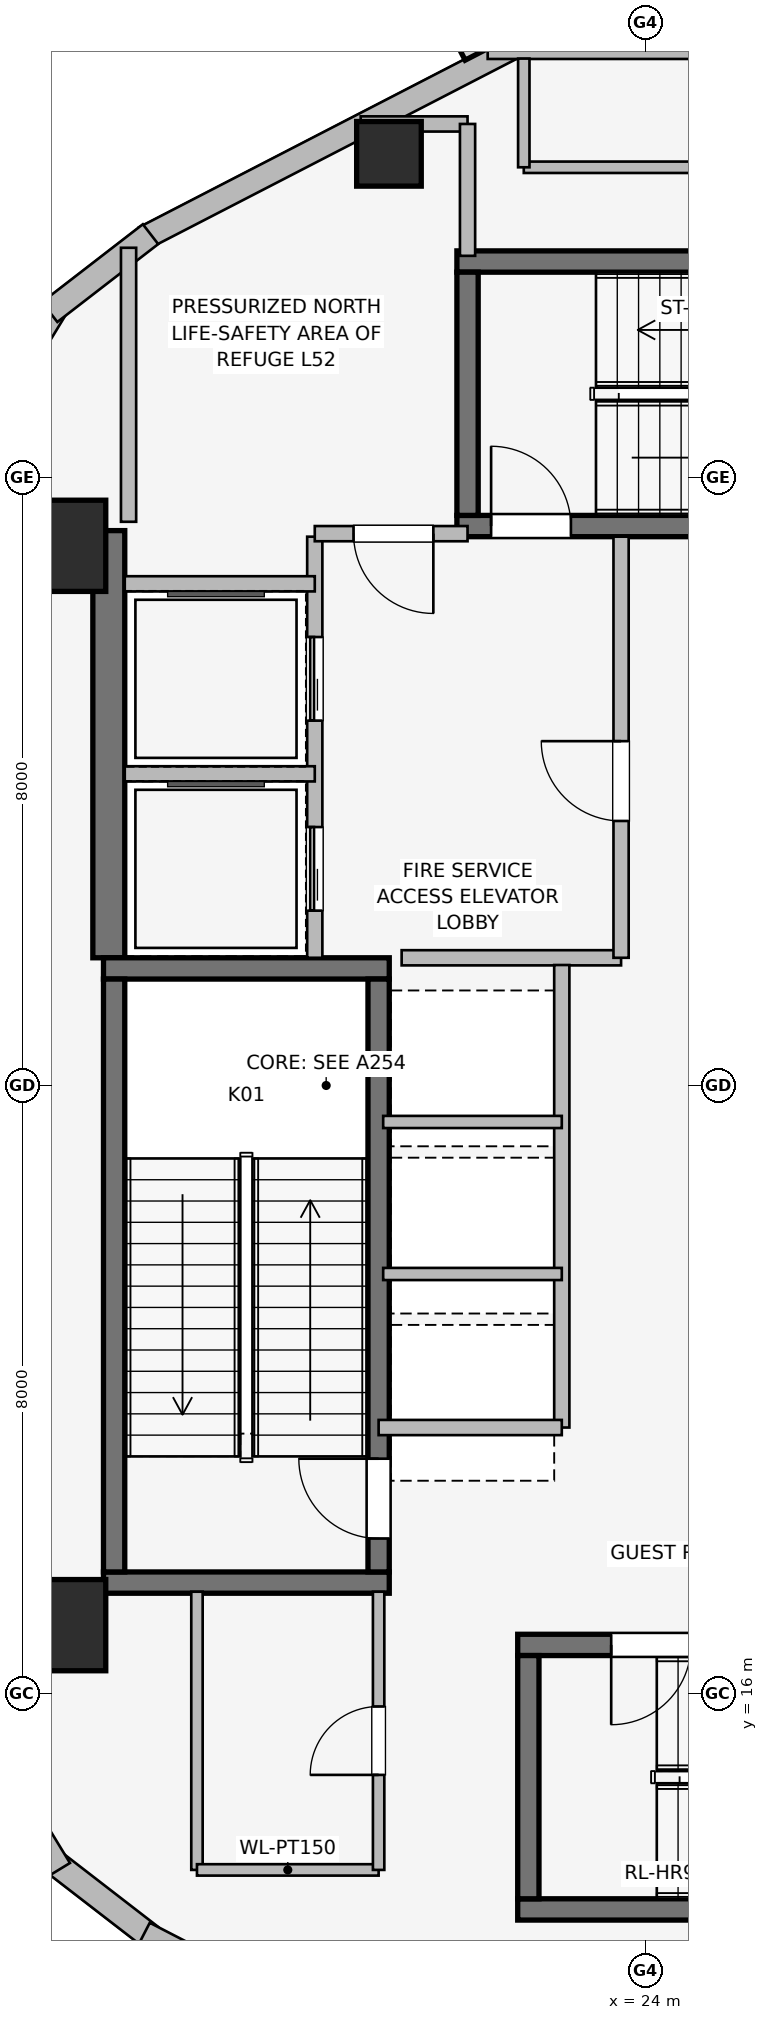
"""IFC4 building model, lengths in metres.
Left out: names, types, materials, properties, quantities, classifications, styles, units other than length and angle.
Written with IfcOpenShell. Run it as: python <this file> out.ifc"""

import sys

from ifc_helpers import new_model, si_unit, direction, frame, frame_2d, origin, origin_2d, place, context, subcontext, project, spatial, rectangle, extrude, element, fill, save


model = new_model("IFC4")
c1 = context("Model", 3, precision=1e-05, world=origin(), true_north=direction((0.0, 1.0)))
c2 = subcontext(c1, "Body", "Model", "MODEL_VIEW")
j1 = project(units=[si_unit("LENGTHUNIT", "METRE"), si_unit("PLANEANGLEUNIT", "RADIAN")], contexts=[c1])
p1 = place(None, origin())
s1 = spatial("IfcSite", under=j1, at=p1, CompositionType="ELEMENT")
p2 = place(p1, origin())
s2 = spatial("IfcBuilding", under=s1, at=p2, CompositionType="ELEMENT")
p3 = place(p2, frame((0.0, 0.0, 191.25)))
s3 = spatial("IfcBuildingStorey", under=s2, at=p3, CompositionType="ELEMENT", Elevation=191.25)
p4 = place(p3, frame((16.94, 25.68, 0.0), z_axis=(0.0, 0.0, 1.0), x_axis=(0.0, 1.0, 0.0)))
e1 = element("IfcWall", 1, at=p4, inside=s3, PredefinedType="SHEAR", context=c2, shape_type="SweptSolid", body=[
    extrude(rectangle(XDim=5.62, YDim=0.42, at=frame_2d((2.81, 0.0))), origin(), (0.0, 0.0, 1.0), 5.2),
])
for number, where, z_axis, x_axis in (
    (2, (16.87, 17.46, 0.0), (0.0, 0.0, 1.0), (1.0, 0.0, 0.0)),
    (3, (20.63, 25.54, 0.0), (0.0, 0.0, 1.0), (-1.0, 0.0, 0.0)),
):
    element("IfcWall", number, at=place(p3, frame(where, z_axis=z_axis, x_axis=x_axis)), inside=s3, PredefinedType="SHEAR", context=c2, shape_type="SweptSolid", body=[
        extrude(rectangle(XDim=3.76, YDim=0.28, at=frame_2d((1.88, 0.0))), origin(), (0.0, 0.0, 1.0), 5.2),
    ])
p5 = place(p3, frame((17.01, 25.4, 0.0), z_axis=(0.0, 0.0, 1.0), x_axis=(0.0, -1.0, 0.0)))
e4 = element("IfcWall", 4, at=p5, inside=s3, PredefinedType="SHEAR", context=c2, shape_type="SweptSolid", body=[
    extrude(rectangle(XDim=7.8, YDim=0.28, at=frame_2d((3.9, 0.0))), origin(), (0.0, 0.0, 1.0), 5.2),
])
p6 = place(p3, frame((20.49, 17.6, 0.0), z_axis=(0.0, 0.0, 1.0), x_axis=(0.0, 1.0, 0.0)))
e5 = element("IfcWall", 5, at=p6, inside=s3, PredefinedType="SHEAR", context=c2, shape_type="SweptSolid", body=[
    extrude(rectangle(XDim=7.8, YDim=0.28, at=frame_2d((3.9, 0.0))), origin(), (0.0, 0.0, 1.0), 5.2),
])
p7 = place(p6, frame((0.44, 0.0, 0.0)))
e6 = element("IfcOpeningElement", 6, at=p7, cuts=e5, PredefinedType="OPENING", context=c2, shape_type="SweptSolid", body=[
    extrude(rectangle(XDim=1.05, YDim=2.0, at=frame_2d((0.525, 1.0))), frame((0.0, 0.15, 0.0), z_axis=(0.0, -1.0, 0.0), x_axis=(1.0, 0.0, 0.0)), (0.0, 0.0, 1.0), 0.3),
])
p8 = place(p3, frame((22.32, 13.16, 0.0), z_axis=(0.0, 0.0, 1.0), x_axis=(1.0, 0.0, 0.0)))
e7 = element("IfcWall", 7, at=p8, inside=s3, PredefinedType="SHEAR", context=c2, shape_type="SweptSolid", body=[
    extrude(rectangle(XDim=8.36, YDim=0.28, at=frame_2d((4.18, 0.0))), origin(), (0.0, 0.0, 1.0), 5.2),
])
p9 = place(p3, frame((30.68, 16.64, 0.0), z_axis=(0.0, 0.0, 1.0), x_axis=(-1.0, 0.0, 0.0)))
e8 = element("IfcWall", 8, at=p9, inside=s3, PredefinedType="SHEAR", context=c2, shape_type="SweptSolid", body=[
    extrude(rectangle(XDim=8.36, YDim=0.28, at=frame_2d((4.18, 0.0))), origin(), (0.0, 0.0, 1.0), 5.2),
])
p10 = place(p9, frame((6.08, 0.0, 0.0)))
e9 = element("IfcOpeningElement", 9, at=p10, cuts=e8, PredefinedType="OPENING", context=c2, shape_type="SweptSolid", body=[
    extrude(rectangle(XDim=1.05, YDim=2.0, at=frame_2d((0.525, 1.0))), frame((0.0, 0.15, 0.0), z_axis=(0.0, -1.0, 0.0), x_axis=(1.0, 0.0, 0.0)), (0.0, 0.0, 1.0), 0.3),
])
p11 = place(p3, frame((22.46, 16.5, 0.0), z_axis=(0.0, 0.0, 1.0), x_axis=(0.0, -1.0, 0.0)))
e10 = element("IfcWall", 10, at=p11, inside=s3, PredefinedType="SHEAR", context=c2, shape_type="SweptSolid", body=[
    extrude(rectangle(XDim=3.2, YDim=0.28, at=frame_2d((1.6, 0.0))), origin(), (0.0, 0.0, 1.0), 5.2),
])
p12 = place(p3, frame((21.52, 31.36, 0.0), z_axis=(0.0, 0.0, 1.0), x_axis=(1.0, 0.0, 0.0)))
e11 = element("IfcWall", 11, at=p12, inside=s3, PredefinedType="SHEAR", context=c2, shape_type="SweptSolid", body=[
    extrude(rectangle(XDim=8.36, YDim=0.28, at=frame_2d((4.18, 0.0))), origin(), (0.0, 0.0, 1.0), 5.2),
])
p13 = place(p12, frame((0.45, 0.0, 0.0)))
e12 = element("IfcOpeningElement", 12, at=p13, cuts=e11, PredefinedType="OPENING", context=c2, shape_type="SweptSolid", body=[
    extrude(rectangle(XDim=1.05, YDim=2.0, at=frame_2d((0.525, 1.0))), frame((0.0, 0.15, 0.0), z_axis=(0.0, -1.0, 0.0), x_axis=(1.0, 0.0, 0.0)), (0.0, 0.0, 1.0), 0.3),
])
p14 = place(p3, frame((29.88, 34.84, 0.0), z_axis=(0.0, 0.0, 1.0), x_axis=(-1.0, 0.0, 0.0)))
e13 = element("IfcWall", 13, at=p14, inside=s3, PredefinedType="SHEAR", context=c2, shape_type="SweptSolid", body=[
    extrude(rectangle(XDim=8.36, YDim=0.28, at=frame_2d((4.18, 0.0))), origin(), (0.0, 0.0, 1.0), 5.2),
])
p15 = place(p3, frame((21.66, 34.7, 0.0), z_axis=(0.0, 0.0, 1.0), x_axis=(0.0, -1.0, 0.0)))
e14 = element("IfcWall", 14, at=p15, inside=s3, PredefinedType="SHEAR", context=c2, shape_type="SweptSolid", body=[
    extrude(rectangle(XDim=3.2, YDim=0.28, at=frame_2d((1.6, 0.0))), origin(), (0.0, 0.0, 1.0), 5.2),
])
for number, where, z_axis, x_axis in (
    (15, (16.3, 16.9, 0.0), (0.0, 0.0, 1.0), (1.0, 0.0, 0.0)),
    (16, (16.3, 31.1, 0.0), (0.0, 0.0, 1.0), (1.0, 0.0, 0.0)),
):
    element("IfcColumn", number, at=place(p3, frame(where, z_axis=z_axis, x_axis=x_axis)), inside=s3, PredefinedType="COLUMN", context=c2, shape_type="SweptSolid", body=[
        extrude(rectangle(XDim=1.2, YDim=1.2, at=origin_2d()), origin(), (0.0, 0.0, 1.0), 5.2),
    ])
p16 = place(p3, frame((20.626, 36.257, 0.0), z_axis=(0.0, 0.0, 1.0), x_axis=(1.0, 0.0, 0.0)))
e17 = element("IfcColumn", 17, at=p16, inside=s3, PredefinedType="COLUMN", context=c2, shape_type="SweptSolid", body=[
    extrude(rectangle(XDim=0.85, YDim=0.85, at=origin_2d()), origin(), (0.0, 0.0, 1.0), 5.2),
])
p17 = place(p3, frame((17.408, 35.153, 0.0), z_axis=(0.0, 0.0, 1.0), x_axis=(0.888626188278, 0.458632202867, 0.0)))
e18 = element("IfcWall", 18, at=p17, inside=s3, PredefinedType="STANDARD", context=c2, shape_type="SweptSolid", body=[
    extrude(rectangle(XDim=16.828, YDim=0.31, at=frame_2d((8.414, 0.0))), origin(), (0.0, 0.0, 1.0), 4.94),
])
p18 = place(p3, frame((15.415, 32.882, 0.0), z_axis=(0.0, 0.0, 1.0), x_axis=(0.520325409202, 0.853968072318, 0.0)))
e19 = element("IfcWall", 19, at=p18, inside=s3, PredefinedType="STANDARD", context=c2, shape_type="SweptSolid", body=[
    extrude(rectangle(XDim=1.678, YDim=0.33, at=frame_2d((0.839, 0.0))), origin(), (0.0, 0.0, 1.0), 4.94),
])
for number, where, z_axis, x_axis in (
    (20, (16.162, 34.175, 0.0), (0.0, 0.0, 1.0), (0.791, 0.611, 0.0)),
    (21, (17.489, 12.8, 0.0), (0.0, 0.0, 1.0), (-0.791, 0.611, 0.0)),
):
    element("IfcWall", number, at=place(p3, frame(where, z_axis=z_axis, x_axis=x_axis)), inside=s3, PredefinedType="STANDARD", context=c2, shape_type="SweptSolid", body=[
        extrude(rectangle(XDim=1.677, YDim=0.33, at=frame_2d((0.838, 0.0))), origin(), (0.0, 0.0, 1.0), 4.94),
    ])
p19 = place(p3, frame((16.288, 13.685, 0.0), z_axis=(0.0, 0.0, 1.0), x_axis=(-0.520325409202, 0.853968072318, 0.0)))
e22 = element("IfcWall", 22, at=p19, inside=s3, PredefinedType="STANDARD", context=c2, shape_type="SweptSolid", body=[
    extrude(rectangle(XDim=1.678, YDim=0.33, at=frame_2d((0.839, 0.0))), origin(), (0.0, 0.0, 1.0), 4.94),
])
p20 = place(p3, frame((32.362, 5.129, 0.0), z_axis=(0.0, 0.0, 1.0), x_axis=(-0.888626188278, 0.458632202867, 0.0)))
e23 = element("IfcWall", 23, at=p20, inside=s3, PredefinedType="STANDARD", context=c2, shape_type="SweptSolid", body=[
    extrude(rectangle(XDim=16.828, YDim=0.31, at=frame_2d((8.414, 0.0))), origin(), (0.0, 0.0, 1.0), 4.94),
])
p21 = place(p3, frame((19.65, 25.68, 0.0), z_axis=(0.0, 0.0, 1.0), x_axis=(0.0, 1.0, 0.0)))
e24 = element("IfcWall", 24, at=p21, inside=s3, PredefinedType="PARTITIONING", context=c2, shape_type="SweptSolid", body=[
    extrude(rectangle(XDim=5.54, YDim=0.2, at=frame_2d((2.77, 0.0))), origin(), (0.0, 0.0, 1.0), 4.94),
])
p22 = place(p21, frame((0.62, 0.0, 0.0)))
e25 = element("IfcOpeningElement", 25, at=p22, cuts=e24, PredefinedType="OPENING", context=c2, shape_type="SweptSolid", body=[
    extrude(rectangle(XDim=1.1, YDim=2.2, at=frame_2d((0.55, 1.1))), frame((0.0, 0.11, 0.0), z_axis=(0.0, -1.0, 0.0), x_axis=(1.0, 0.0, 0.0)), (0.0, 0.0, 1.0), 0.22),
])
p23 = place(p21, frame((3.12, 0.0, 0.0)))
e26 = element("IfcOpeningElement", 26, at=p23, cuts=e24, PredefinedType="OPENING", context=c2, shape_type="SweptSolid", body=[
    extrude(rectangle(XDim=1.1, YDim=2.2, at=frame_2d((0.55, 1.1))), frame((0.0, 0.11, 0.0), z_axis=(0.0, -1.0, 0.0), x_axis=(1.0, 0.0, 0.0)), (0.0, 0.0, 1.0), 0.22),
])
p24 = place(p3, frame((20.793, 25.68, 0.0), z_axis=(0.0, 0.0, 1.0), x_axis=(1.0, 0.0, 0.0)))
e27 = element("IfcWall", 27, at=p24, inside=s3, PredefinedType="PARTITIONING", context=c2, shape_type="SweptSolid", body=[
    extrude(rectangle(XDim=2.887, YDim=0.2, at=frame_2d((1.443, 0.0))), origin(), (0.0, 0.0, 1.0), 4.94),
])
p25 = place(p3, frame((23.68, 25.68, 0.0), z_axis=(0.0, 0.0, 1.0), x_axis=(0.0, 1.0, 0.0)))
e28 = element("IfcWall", 28, at=p25, inside=s3, PredefinedType="PARTITIONING", context=c2, shape_type="SweptSolid", body=[
    extrude(rectangle(XDim=5.54, YDim=0.2, at=frame_2d((2.77, 0.0))), origin(), (0.0, 0.0, 1.0), 4.94),
])
p26 = place(p25, frame((1.8, 0.0, 0.0)))
e29 = element("IfcOpeningElement", 29, at=p26, cuts=e28, PredefinedType="OPENING", context=c2, shape_type="SweptSolid", body=[
    extrude(rectangle(XDim=1.05, YDim=2.0, at=frame_2d((0.525, 1.0))), frame((0.0, 0.11, 0.0), z_axis=(0.0, -1.0, 0.0), x_axis=(1.0, 0.0, 0.0)), (0.0, 0.0, 1.0), 0.22),
])
p27 = place(p3, frame((21.66, 31.26, 0.0), z_axis=(0.0, 0.0, 1.0), x_axis=(-1.0, 0.0, 0.0)))
e30 = element("IfcWall", 30, at=p27, inside=s3, PredefinedType="PARTITIONING", context=c2, shape_type="SweptSolid", body=[
    extrude(rectangle(XDim=2.01, YDim=0.2, at=frame_2d((1.005, 0.0))), origin(), (0.0, 0.0, 1.0), 4.94),
])
p28 = place(p27, frame((0.45, 0.0, 0.0)))
e31 = element("IfcOpeningElement", 31, at=p28, cuts=e30, PredefinedType="OPENING", context=c2, shape_type="SweptSolid", body=[
    extrude(rectangle(XDim=1.05, YDim=2.0, at=frame_2d((0.525, 1.0))), frame((0.0, 0.11, 0.0), z_axis=(0.0, -1.0, 0.0), x_axis=(1.0, 0.0, 0.0)), (0.0, 0.0, 1.0), 0.22),
])
p29 = place(p3, frame((17.15, 28.1, 0.0), z_axis=(0.0, 0.0, 1.0), x_axis=(1.0, 0.0, 0.0)))
e32 = element("IfcWall", 32, at=p29, inside=s3, PredefinedType="PARTITIONING", context=c2, shape_type="SweptSolid", body=[
    extrude(rectangle(XDim=2.5, YDim=0.2, at=frame_2d((1.25, 0.0))), origin(), (0.0, 0.0, 1.0), 4.94),
])
p30 = place(p3, frame((19.65, 30.6, 0.0), z_axis=(0.0, 0.0, 1.0), x_axis=(-1.0, 0.0, 0.0)))
e33 = element("IfcWall", 33, at=p30, inside=s3, PredefinedType="PARTITIONING", context=c2, shape_type="SweptSolid", body=[
    extrude(rectangle(XDim=2.5, YDim=0.2, at=frame_2d((1.25, 0.0))), origin(), (0.0, 0.0, 1.0), 3.84),
])
p31 = place(p3, frame((22.9, 19.5, 0.0), z_axis=(0.0, 0.0, 1.0), x_axis=(0.0, 1.0, 0.0)))
e34 = element("IfcWall", 34, at=p31, inside=s3, PredefinedType="PARTITIONING", context=c2, shape_type="SweptSolid", body=[
    extrude(rectangle(XDim=6.085, YDim=0.2, at=frame_2d((3.042, 0.0))), origin(), (0.0, 0.0, 1.0), 4.94),
])
p32 = place(p3, frame((20.49, 19.5, 0.0), z_axis=(0.0, 0.0, 1.0), x_axis=(1.0, 0.0, 0.0)))
e35 = element("IfcWall", 35, at=p32, inside=s3, PredefinedType="PARTITIONING", context=c2, shape_type="SweptSolid", body=[
    extrude(rectangle(XDim=2.41, YDim=0.2, at=frame_2d((1.205, 0.0))), origin(), (0.0, 0.0, 1.0), 3.84),
])
for number, where, z_axis, x_axis in (
    (36, (20.55, 21.52, 0.0), (0.0, 0.0, 1.0), (1.0, 0.0, 0.0)),
    (37, (20.55, 23.52, 0.0), (0.0, 0.0, 1.0), (1.0, 0.0, 0.0)),
):
    element("IfcWall", number, at=place(p3, frame(where, z_axis=z_axis, x_axis=x_axis)), inside=s3, PredefinedType="PARTITIONING", context=c2, shape_type="SweptSolid", body=[
        extrude(rectangle(XDim=2.35, YDim=0.16, at=frame_2d((1.175, 0.0))), origin(), (0.0, 0.0, 1.0), 4.94),
    ])
p33 = place(p3, frame((18.1, 17.34, 0.0), z_axis=(0.0, 0.0, 1.0), x_axis=(0.0, -1.0, 0.0)))
e38 = element("IfcWall", 38, at=p33, inside=s3, PredefinedType="PARTITIONING", context=c2, shape_type="SweptSolid", body=[
    extrude(rectangle(XDim=3.66, YDim=0.15, at=frame_2d((1.83, 0.0))), origin(), (0.0, 0.0, 1.0), 4.94),
])
p34 = place(p3, frame((18.1, 13.68, 0.0), z_axis=(0.0, 0.0, 1.0), x_axis=(1.0, 0.0, 0.0)))
e39 = element("IfcWall", 39, at=p34, inside=s3, PredefinedType="PARTITIONING", context=c2, shape_type="SweptSolid", body=[
    extrude(rectangle(XDim=2.39, YDim=0.15, at=frame_2d((1.195, 0.0))), origin(), (0.0, 0.0, 1.0), 4.94),
])
p35 = place(p3, frame((20.49, 13.68, 0.0), z_axis=(0.0, 0.0, 1.0), x_axis=(0.0, 1.0, 0.0)))
e40 = element("IfcWall", 40, at=p35, inside=s3, PredefinedType="PARTITIONING", context=c2, shape_type="SweptSolid", body=[
    extrude(rectangle(XDim=3.66, YDim=0.15, at=frame_2d((1.83, 0.0))), origin(), (0.0, 0.0, 1.0), 4.94),
])
p36 = place(p35, frame((1.25, 0.0, 0.0)))
e41 = element("IfcOpeningElement", 41, at=p36, cuts=e40, PredefinedType="OPENING", context=c2, shape_type="SweptSolid", body=[
    extrude(rectangle(XDim=0.9, YDim=2.0, at=frame_2d((0.45, 1.0))), frame((0.0, 0.085, 0.0), z_axis=(0.0, -1.0, 0.0), x_axis=(1.0, 0.0, 0.0)), (0.0, 0.0, 1.0), 0.17),
])
p37 = place(p3, frame((17.2, 35.021, 0.0), z_axis=(0.0, 0.0, 1.0), x_axis=(0.0, -1.0, 0.0)))
e42 = element("IfcWall", 42, at=p37, inside=s3, PredefinedType="PARTITIONING", context=c2, shape_type="SweptSolid", body=[
    extrude(rectangle(XDim=3.605, YDim=0.2, at=frame_2d((1.802, 0.0))), origin(), (0.0, 0.0, 1.0), 4.94),
])
p38 = place(p3, frame((21.66, 36.65, 0.0), z_axis=(0.0, 0.0, 1.0), x_axis=(-1.0, 0.0, 0.0)))
e43 = element("IfcWall", 43, at=p38, inside=s3, PredefinedType="PARTITIONING", context=c2, shape_type="SweptSolid", body=[
    extrude(rectangle(XDim=1.406, YDim=0.2, at=frame_2d((0.703, 0.0))), origin(), (0.0, 0.0, 1.0), 4.94),
])
p39 = place(p3, frame((21.66, 34.915, 0.0), z_axis=(0.0, 0.0, 1.0), x_axis=(0.0, 1.0, 0.0)))
e44 = element("IfcWall", 44, at=p39, inside=s3, PredefinedType="PARTITIONING", context=c2, shape_type="SweptSolid", body=[
    extrude(rectangle(XDim=1.735, YDim=0.2, at=frame_2d((0.867, 0.0))), origin(), (0.0, 0.0, 1.0), 4.94),
])
p40 = place(p3, frame((34.0, 37.58, 0.0), z_axis=(0.0, 0.0, 1.0), x_axis=(-1.0, 0.0, 0.0)))
e45 = element("IfcWall", 45, at=p40, inside=s3, PredefinedType="PARTITIONING", context=c2, shape_type="SweptSolid", body=[
    extrude(rectangle(XDim=12.075, YDim=0.15, at=frame_2d((6.038, 0.0))), origin(), (0.0, 0.0, 1.0), 4.94),
])
p41 = place(p40, frame((4.07, 0.0, 0.0)))
e46 = element("IfcOpeningElement", 46, at=p41, cuts=e45, PredefinedType="OPENING", context=c2, shape_type="SweptSolid", body=[
    extrude(rectangle(XDim=0.96, YDim=2.0, at=frame_2d((0.48, 1.0))), frame((0.0, 0.085, 0.0), z_axis=(0.0, -1.0, 0.0), x_axis=(1.0, 0.0, 0.0)), (0.0, 0.0, 1.0), 0.17),
])
p42 = place(p3, frame((29.753, 36.08, 0.0), z_axis=(0.0, 0.0, 1.0), x_axis=(-1.0, 0.0, 0.0)))
e47 = element("IfcWall", 47, at=p42, inside=s3, PredefinedType="PARTITIONING", context=c2, shape_type="SweptSolid", body=[
    extrude(rectangle(XDim=7.353, YDim=0.15, at=frame_2d((3.677, 0.0))), origin(), (0.0, 0.0, 1.0), 4.94),
])
p43 = place(p3, frame((22.4, 36.08, 0.0), z_axis=(0.0, 0.0, 1.0), x_axis=(0.0, 1.0, 0.0)))
e48 = element("IfcWall", 48, at=p43, inside=s3, PredefinedType="PARTITIONING", context=c2, shape_type="SweptSolid", body=[
    extrude(rectangle(XDim=1.43, YDim=0.15, at=frame_2d((0.715, 0.0))), origin(), (0.0, 0.0, 1.0), 4.94),
])
p44 = place(p7, origin())
e49 = element("IfcDoor", 49, at=p44, inside=s3, OperationType="SINGLE_SWING_RIGHT", PredefinedType="DOOR", context=c2, shape_type="SweptSolid", body=[
    extrude(rectangle(XDim=1.05, YDim=2.0, at=frame_2d((0.525, 1.0))), frame((0.0, 0.025, 0.0), z_axis=(0.0, -1.0, 0.0), x_axis=(1.0, 0.0, 0.0)), (0.0, 0.0, 1.0), 0.05),
])
fill(e6, e49)
p45 = place(p10, origin())
e50 = element("IfcDoor", 50, at=p45, inside=s3, OperationType="SINGLE_SWING_RIGHT", PredefinedType="DOOR", context=c2, shape_type="SweptSolid", body=[
    extrude(rectangle(XDim=1.05, YDim=2.0, at=frame_2d((0.525, 1.0))), frame((0.0, 0.025, 0.0), z_axis=(0.0, -1.0, 0.0), x_axis=(1.0, 0.0, 0.0)), (0.0, 0.0, 1.0), 0.05),
])
fill(e9, e50)
p46 = place(p13, origin())
e51 = element("IfcDoor", 51, at=p46, inside=s3, OperationType="SINGLE_SWING_LEFT", PredefinedType="DOOR", context=c2, shape_type="SweptSolid", body=[
    extrude(rectangle(XDim=1.05, YDim=2.0, at=frame_2d((0.525, 1.0))), frame((0.0, 0.025, 0.0), z_axis=(0.0, -1.0, 0.0), x_axis=(1.0, 0.0, 0.0)), (0.0, 0.0, 1.0), 0.05),
])
fill(e12, e51)
p47 = place(p22, origin())
e52 = element("IfcDoor", 52, at=p47, inside=s3, OperationType="SLIDING_TO_LEFT", PredefinedType="DOOR", context=c2, shape_type="SweptSolid", body=[
    extrude(rectangle(XDim=1.1, YDim=2.2, at=frame_2d((0.55, 1.1))), frame((0.0, 0.025, 0.0), z_axis=(0.0, -1.0, 0.0), x_axis=(1.0, 0.0, 0.0)), (0.0, 0.0, 1.0), 0.05),
])
fill(e25, e52)
p48 = place(p23, origin())
e53 = element("IfcDoor", 53, at=p48, inside=s3, OperationType="SLIDING_TO_LEFT", PredefinedType="DOOR", context=c2, shape_type="SweptSolid", body=[
    extrude(rectangle(XDim=1.1, YDim=2.2, at=frame_2d((0.55, 1.1))), frame((0.0, 0.025, 0.0), z_axis=(0.0, -1.0, 0.0), x_axis=(1.0, 0.0, 0.0)), (0.0, 0.0, 1.0), 0.05),
])
fill(e26, e53)
p49 = place(p26, origin())
e54 = element("IfcDoor", 54, at=p49, inside=s3, OperationType="SINGLE_SWING_RIGHT", PredefinedType="DOOR", context=c2, shape_type="SweptSolid", body=[
    extrude(rectangle(XDim=1.05, YDim=2.0, at=frame_2d((0.525, 1.0))), frame((0.0, 0.025, 0.0), z_axis=(0.0, -1.0, 0.0), x_axis=(1.0, 0.0, 0.0)), (0.0, 0.0, 1.0), 0.05),
])
fill(e29, e54)
p50 = place(p28, origin())
e55 = element("IfcDoor", 55, at=p50, inside=s3, OperationType="SINGLE_SWING_LEFT", PredefinedType="DOOR", context=c2, shape_type="SweptSolid", body=[
    extrude(rectangle(XDim=1.05, YDim=2.0, at=frame_2d((0.525, 1.0))), frame((0.0, 0.025, 0.0), z_axis=(0.0, -1.0, 0.0), x_axis=(1.0, 0.0, 0.0)), (0.0, 0.0, 1.0), 0.05),
])
fill(e31, e55)
p51 = place(p36, origin())
e56 = element("IfcDoor", 56, at=p51, inside=s3, OperationType="SINGLE_SWING_LEFT", PredefinedType="DOOR", context=c2, shape_type="SweptSolid", body=[
    extrude(rectangle(XDim=0.9, YDim=2.0, at=frame_2d((0.45, 1.0))), frame((0.0, 0.025, 0.0), z_axis=(0.0, -1.0, 0.0), x_axis=(1.0, 0.0, 0.0)), (0.0, 0.0, 1.0), 0.05),
])
fill(e41, e56)
save(model, sys.argv[1])
